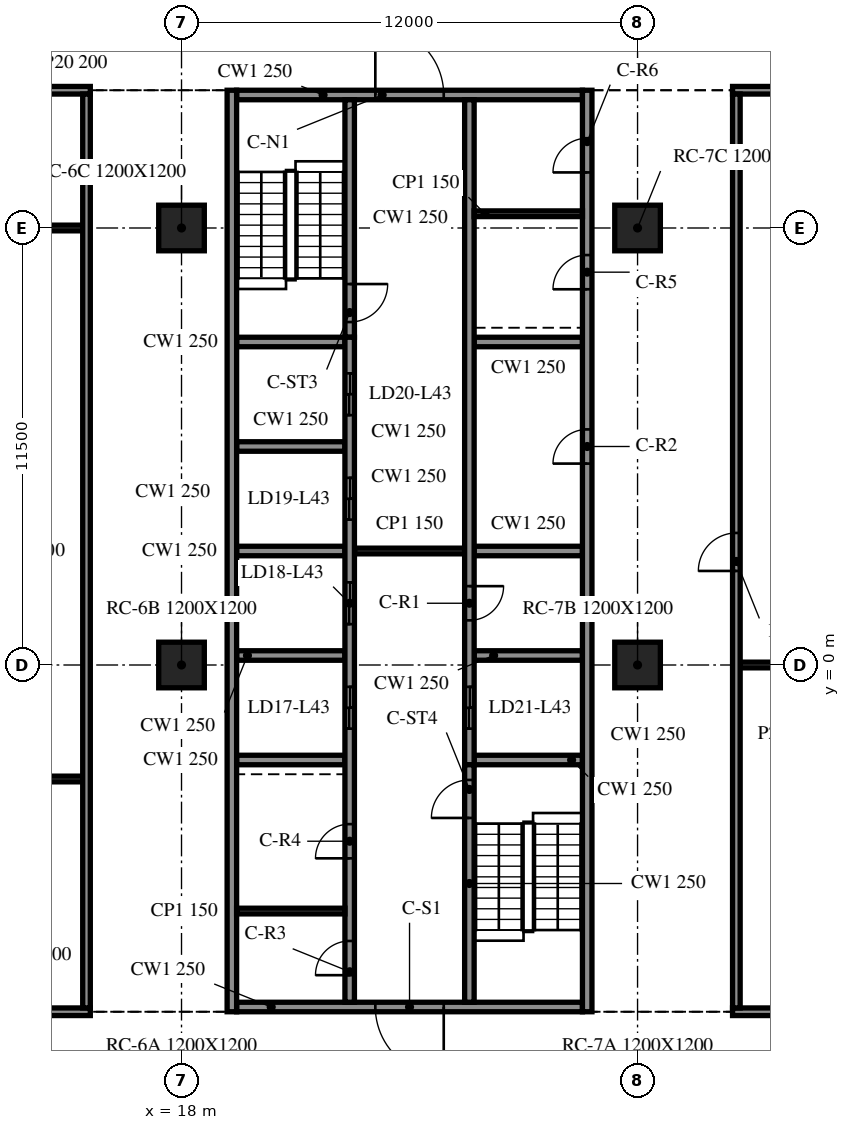
"""IFC4 building model, lengths in metres.
Left out: names, types, materials, properties, quantities, classifications, styles, units other than length and angle.
Written with IfcOpenShell. Run it as: python <this file> out.ifc"""

import sys

from ifc_helpers import new_model, si_unit, direction, frame, frame_2d, origin, origin_2d, place, context, subcontext, project, spatial, rectangle, extrude, element, fill, save


model = new_model("IFC4")
c1 = context("Model", 3, precision=1e-05, world=origin(), true_north=direction((0.0, 1.0)))
c2 = subcontext(c1, "Body", "Model", "MODEL_VIEW")
j1 = project(units=[si_unit("LENGTHUNIT", "METRE"), si_unit("PLANEANGLEUNIT", "RADIAN")], contexts=[c1])
p1 = place(None, origin())
s1 = spatial("IfcSite", under=j1, at=p1, CompositionType="ELEMENT")
p2 = place(p1, origin())
s2 = spatial("IfcBuilding", under=s1, at=p2, CompositionType="ELEMENT")
p3 = place(p2, frame((0.0, 0.0, 182.0)))
s3 = spatial("IfcBuildingStorey", under=s2, at=p3, CompositionType="ELEMENT", Elevation=182.0)
for number, where, z_axis, x_axis in (
    (1, (18.0, 0.0, -0.34), (0.0, 0.0, 1.0), (1.0, 0.0, 0.0)),
    (2, (18.0, 11.5, -0.34), (0.0, 0.0, 1.0), (1.0, 0.0, 0.0)),
    (3, (30.0, 0.0, -0.34), (0.0, 0.0, 1.0), (1.0, 0.0, 0.0)),
    (4, (30.0, 11.5, -0.34), (0.0, 0.0, 1.0), (1.0, 0.0, 0.0)),
):
    element("IfcColumn", number, at=place(p3, frame(where, z_axis=z_axis, x_axis=x_axis)), inside=s3, PredefinedType="COLUMN", context=c2, shape_type="SweptSolid", body=[
        extrude(rectangle(XDim=1.2, YDim=1.2, at=origin_2d()), origin(), (0.0, 0.0, 1.0), 3.8),
    ])
p4 = place(p3, frame((19.325, 15.125, 0.0), z_axis=(0.0, 0.0, 1.0), x_axis=(0.0, -1.0, 0.0)))
e5 = element("IfcWall", 5, at=p4, inside=s3, PredefinedType="SOLIDWALL", context=c2, shape_type="SweptSolid", body=[
    extrude(rectangle(XDim=24.25, YDim=0.25, at=frame_2d((12.125, 0.0))), origin(), (0.0, 0.0, 1.0), 3.46),
])
p5 = place(p3, frame((28.675, -9.125, 0.0), z_axis=(0.0, 0.0, 1.0), x_axis=(0.0, 1.0, 0.0)))
e6 = element("IfcWall", 6, at=p5, inside=s3, PredefinedType="SOLIDWALL", context=c2, shape_type="SweptSolid", body=[
    extrude(rectangle(XDim=24.25, YDim=0.25, at=frame_2d((12.125, 0.0))), origin(), (0.0, 0.0, 1.0), 3.46),
])
p6 = place(p5, frame((14.425, 0.0, 0.0)))
e7 = element("IfcOpeningElement", 7, at=p6, cuts=e6, PredefinedType="OPENING", context=c2, shape_type="SweptSolid", body=[
    extrude(rectangle(XDim=0.9, YDim=2.1, at=frame_2d((0.45, 1.05))), frame((0.0, 0.135, 0.0), z_axis=(0.0, -1.0, 0.0), x_axis=(1.0, 0.0, 0.0)), (0.0, 0.0, 1.0), 0.27),
])
p7 = place(p5, frame((19.012, 0.0, 0.0)))
e8 = element("IfcOpeningElement", 8, at=p7, cuts=e6, PredefinedType="OPENING", context=c2, shape_type="SweptSolid", body=[
    extrude(rectangle(XDim=0.9, YDim=2.1, at=frame_2d((0.45, 1.05))), frame((0.0, 0.135, 0.0), z_axis=(0.0, -1.0, 0.0), x_axis=(1.0, 0.0, 0.0)), (0.0, 0.0, 1.0), 0.27),
])
p8 = place(p5, frame((22.087, 0.0, 0.0)))
e9 = element("IfcOpeningElement", 9, at=p8, cuts=e6, PredefinedType="OPENING", context=c2, shape_type="SweptSolid", body=[
    extrude(rectangle(XDim=0.9, YDim=2.1, at=frame_2d((0.45, 1.05))), frame((0.0, 0.135, 0.0), z_axis=(0.0, -1.0, 0.0), x_axis=(1.0, 0.0, 0.0)), (0.0, 0.0, 1.0), 0.27),
])
p9 = place(p3, frame((28.55, -9.0, 0.0), z_axis=(0.0, 0.0, 1.0), x_axis=(-1.0, 0.0, 0.0)))
e10 = element("IfcWall", 10, at=p9, inside=s3, PredefinedType="SOLIDWALL", context=c2, shape_type="SweptSolid", body=[
    extrude(rectangle(XDim=9.1, YDim=0.25, at=frame_2d((4.55, 0.0))), origin(), (0.0, 0.0, 1.0), 3.46),
])
p10 = place(p9, frame((3.65, 0.0, 0.0)))
e11 = element("IfcOpeningElement", 11, at=p10, cuts=e10, PredefinedType="OPENING", context=c2, shape_type="SweptSolid", body=[
    extrude(rectangle(XDim=1.8, YDim=2.1, at=frame_2d((0.9, 1.05))), frame((0.0, 0.135, 0.0), z_axis=(0.0, -1.0, 0.0), x_axis=(1.0, 0.0, 0.0)), (0.0, 0.0, 1.0), 0.27),
])
p11 = place(p3, frame((19.45, 15.0, 0.0), z_axis=(0.0, 0.0, 1.0), x_axis=(1.0, 0.0, 0.0)))
e12 = element("IfcWall", 12, at=p11, inside=s3, PredefinedType="SOLIDWALL", context=c2, shape_type="SweptSolid", body=[
    extrude(rectangle(XDim=9.1, YDim=0.25, at=frame_2d((4.55, 0.0))), origin(), (0.0, 0.0, 1.0), 3.46),
])
p12 = place(p11, frame((3.65, 0.0, 0.0)))
e13 = element("IfcOpeningElement", 13, at=p12, cuts=e12, PredefinedType="OPENING", context=c2, shape_type="SweptSolid", body=[
    extrude(rectangle(XDim=1.8, YDim=2.1, at=frame_2d((0.9, 1.05))), frame((0.0, 0.135, 0.0), z_axis=(0.0, -1.0, 0.0), x_axis=(1.0, 0.0, 0.0)), (0.0, 0.0, 1.0), 0.27),
])
p13 = place(p3, frame((22.425, -8.875, 0.0), z_axis=(0.0, 0.0, 1.0), x_axis=(0.0, 1.0, 0.0)))
e14 = element("IfcWall", 14, at=p13, inside=s3, PredefinedType="SOLIDWALL", context=c2, shape_type="SweptSolid", body=[
    extrude(rectangle(XDim=17.5, YDim=0.25, at=frame_2d((8.75, 0.0))), origin(), (0.0, 0.0, 1.0), 3.46),
])
p14 = place(p13, frame((7.2, 0.0, 0.0)))
e15 = element("IfcOpeningElement", 15, at=p14, cuts=e14, PredefinedType="OPENING", context=c2, shape_type="SweptSolid", body=[
    extrude(rectangle(XDim=1.1, YDim=2.1, at=frame_2d((0.55, 1.05))), frame((0.0, 0.135, 0.0), z_axis=(0.0, -1.0, 0.0), x_axis=(1.0, 0.0, 0.0)), (0.0, 0.0, 1.0), 0.27),
])
p15 = place(p13, frame((9.95, 0.0, 0.0)))
e16 = element("IfcOpeningElement", 16, at=p15, cuts=e14, PredefinedType="OPENING", context=c2, shape_type="SweptSolid", body=[
    extrude(rectangle(XDim=1.1, YDim=2.1, at=frame_2d((0.55, 1.05))), frame((0.0, 0.135, 0.0), z_axis=(0.0, -1.0, 0.0), x_axis=(1.0, 0.0, 0.0)), (0.0, 0.0, 1.0), 0.27),
])
p16 = place(p13, frame((12.7, 0.0, 0.0)))
e17 = element("IfcOpeningElement", 17, at=p16, cuts=e14, PredefinedType="OPENING", context=c2, shape_type="SweptSolid", body=[
    extrude(rectangle(XDim=1.1, YDim=2.1, at=frame_2d((0.55, 1.05))), frame((0.0, 0.135, 0.0), z_axis=(0.0, -1.0, 0.0), x_axis=(1.0, 0.0, 0.0)), (0.0, 0.0, 1.0), 0.27),
])
p17 = place(p13, frame((15.45, 0.0, 0.0)))
e18 = element("IfcOpeningElement", 18, at=p17, cuts=e14, PredefinedType="OPENING", context=c2, shape_type="SweptSolid", body=[
    extrude(rectangle(XDim=1.1, YDim=2.1, at=frame_2d((0.55, 1.05))), frame((0.0, 0.135, 0.0), z_axis=(0.0, -1.0, 0.0), x_axis=(1.0, 0.0, 0.0)), (0.0, 0.0, 1.0), 0.27),
])
p18 = place(p13, frame((0.712, 0.0, 0.0)))
e19 = element("IfcOpeningElement", 19, at=p18, cuts=e14, PredefinedType="OPENING", context=c2, shape_type="SweptSolid", body=[
    extrude(rectangle(XDim=0.9, YDim=2.1, at=frame_2d((0.45, 1.05))), frame((0.0, 0.135, 0.0), z_axis=(0.0, -1.0, 0.0), x_axis=(1.0, 0.0, 0.0)), (0.0, 0.0, 1.0), 0.27),
])
p19 = place(p13, frame((3.788, 0.0, 0.0)))
e20 = element("IfcOpeningElement", 20, at=p19, cuts=e14, PredefinedType="OPENING", context=c2, shape_type="SweptSolid", body=[
    extrude(rectangle(XDim=0.9, YDim=2.1, at=frame_2d((0.45, 1.05))), frame((0.0, 0.135, 0.0), z_axis=(0.0, -1.0, 0.0), x_axis=(1.0, 0.0, 0.0)), (0.0, 0.0, 1.0), 0.27),
])
p20 = place(p3, frame((22.425, 14.875, 0.0), z_axis=(0.0, 0.0, 1.0), x_axis=(0.0, -1.0, 0.0)))
e21 = element("IfcWall", 21, at=p20, inside=s3, PredefinedType="SOLIDWALL", context=c2, shape_type="SweptSolid", body=[
    extrude(rectangle(XDim=6.25, YDim=0.25, at=frame_2d((3.125, 0.0))), origin(), (0.0, 0.0, 1.0), 3.46),
])
p21 = place(p20, frame((4.85, 0.0, 0.0)))
e22 = element("IfcOpeningElement", 22, at=p21, cuts=e21, PredefinedType="OPENING", context=c2, shape_type="SweptSolid", body=[
    extrude(rectangle(XDim=1.0, YDim=2.1, at=frame_2d((0.5, 1.05))), frame((0.0, 0.135, 0.0), z_axis=(0.0, -1.0, 0.0), x_axis=(1.0, 0.0, 0.0)), (0.0, 0.0, 1.0), 0.27),
])
p22 = place(p3, frame((25.575, -8.875, 0.0), z_axis=(0.0, 0.0, 1.0), x_axis=(0.0, 1.0, 0.0)))
e23 = element("IfcWall", 23, at=p22, inside=s3, PredefinedType="SOLIDWALL", context=c2, shape_type="SweptSolid", body=[
    extrude(rectangle(XDim=6.25, YDim=0.25, at=frame_2d((3.125, 0.0))), origin(), (0.0, 0.0, 1.0), 3.46),
])
p23 = place(p22, frame((4.85, 0.0, 0.0)))
e24 = element("IfcOpeningElement", 24, at=p23, cuts=e23, PredefinedType="OPENING", context=c2, shape_type="SweptSolid", body=[
    extrude(rectangle(XDim=1.0, YDim=2.1, at=frame_2d((0.5, 1.05))), frame((0.0, 0.135, 0.0), z_axis=(0.0, -1.0, 0.0), x_axis=(1.0, 0.0, 0.0)), (0.0, 0.0, 1.0), 0.27),
])
p24 = place(p3, frame((25.575, 14.875, 0.0), z_axis=(0.0, 0.0, 1.0), x_axis=(0.0, -1.0, 0.0)))
e25 = element("IfcWall", 25, at=p24, inside=s3, PredefinedType="SOLIDWALL", context=c2, shape_type="SweptSolid", body=[
    extrude(rectangle(XDim=17.5, YDim=0.25, at=frame_2d((8.75, 0.0))), origin(), (0.0, 0.0, 1.0), 3.46),
])
p25 = place(p24, frame((15.45, 0.0, 0.0)))
e26 = element("IfcOpeningElement", 26, at=p25, cuts=e25, PredefinedType="OPENING", context=c2, shape_type="SweptSolid", body=[
    extrude(rectangle(XDim=1.1, YDim=2.1, at=frame_2d((0.55, 1.05))), frame((0.0, 0.135, 0.0), z_axis=(0.0, -1.0, 0.0), x_axis=(1.0, 0.0, 0.0)), (0.0, 0.0, 1.0), 0.27),
])
p26 = place(p24, frame((12.8, 0.0, 0.0)))
e27 = element("IfcOpeningElement", 27, at=p26, cuts=e25, PredefinedType="OPENING", context=c2, shape_type="SweptSolid", body=[
    extrude(rectangle(XDim=0.9, YDim=2.1, at=frame_2d((0.45, 1.05))), frame((0.0, 0.135, 0.0), z_axis=(0.0, -1.0, 0.0), x_axis=(1.0, 0.0, 0.0)), (0.0, 0.0, 1.0), 0.27),
])
for number, where, z_axis, x_axis in (
    (28, (19.45, -2.5, 0.0), (0.0, 0.0, 1.0), (1.0, 0.0, 0.0)),
    (29, (19.45, 0.25, 0.0), (0.0, 0.0, 1.0), (1.0, 0.0, 0.0)),
    (30, (19.45, 3.0, 0.0), (0.0, 0.0, 1.0), (1.0, 0.0, 0.0)),
    (31, (19.45, 5.75, 0.0), (0.0, 0.0, 1.0), (1.0, 0.0, 0.0)),
    (32, (19.45, 8.5, 0.0), (0.0, 0.0, 1.0), (1.0, 0.0, 0.0)),
    (33, (25.7, -2.5, 0.0), (0.0, 0.0, 1.0), (1.0, 0.0, 0.0)),
    (34, (25.7, 0.25, 0.0), (0.0, 0.0, 1.0), (1.0, 0.0, 0.0)),
    (35, (25.7, 3.0, 0.0), (0.0, 0.0, 1.0), (1.0, 0.0, 0.0)),
    (36, (25.7, 8.5, 0.0), (0.0, 0.0, 1.0), (1.0, 0.0, 0.0)),
):
    element("IfcWall", number, at=place(p3, frame(where, z_axis=z_axis, x_axis=x_axis)), inside=s3, PredefinedType="SOLIDWALL", context=c2, shape_type="SweptSolid", body=[
        extrude(rectangle(XDim=2.85, YDim=0.25, at=frame_2d((1.425, 0.0))), origin(), (0.0, 0.0, 1.0), 3.46),
    ])
p27 = place(p3, frame((22.55, 3.0, 0.0), z_axis=(0.0, 0.0, 1.0), x_axis=(1.0, 0.0, 0.0)))
e37 = element("IfcWall", 37, at=p27, inside=s3, PredefinedType="PARTITIONING", context=c2, shape_type="SweptSolid", body=[
    extrude(rectangle(XDim=2.9, YDim=0.15, at=frame_2d((1.45, 0.0))), origin(), (0.0, 0.0, 1.0), 3.46),
])
for number, where, z_axis, x_axis in (
    (38, (19.45, -6.475, 0.0), (0.0, 0.0, 1.0), (1.0, 0.0, 0.0)),
    (39, (25.7, 11.875, 0.0), (0.0, 0.0, 1.0), (1.0, 0.0, 0.0)),
):
    element("IfcWall", number, at=place(p3, frame(where, z_axis=z_axis, x_axis=x_axis)), inside=s3, PredefinedType="PARTITIONING", context=c2, shape_type="SweptSolid", body=[
        extrude(rectangle(XDim=2.85, YDim=0.15, at=frame_2d((1.425, 0.0))), origin(), (0.0, 0.0, 1.0), 3.46),
    ])
p28 = place(p3, frame((8.3, -9.125, 0.0), z_axis=(0.0, 0.0, 1.0), x_axis=(1.0, 0.0, 0.0)))
e40 = element("IfcWall", 40, at=p28, inside=s3, PredefinedType="PARTITIONING", context=c2, shape_type="SweptSolid", body=[
    extrude(rectangle(XDim=7.3, YDim=0.2, at=frame_2d((3.65, 0.0))), origin(), (0.0, 0.0, 1.0), 3.46),
])
p29 = place(p28, frame((3.1, 0.0, 0.0)))
e41 = element("IfcOpeningElement", 41, at=p29, cuts=e40, PredefinedType="OPENING", context=c2, shape_type="SweptSolid", body=[
    extrude(rectangle(XDim=0.9, YDim=2.1, at=frame_2d((0.45, 1.05))), frame((0.0, 0.11, 0.0), z_axis=(0.0, -1.0, 0.0), x_axis=(1.0, 0.0, 0.0)), (0.0, 0.0, 1.0), 0.22),
])
p30 = place(p3, frame((32.5, -9.125, 0.0), z_axis=(0.0, 0.0, 1.0), x_axis=(1.0, 0.0, 0.0)))
e42 = element("IfcWall", 42, at=p30, inside=s3, PredefinedType="PARTITIONING", context=c2, shape_type="SweptSolid", body=[
    extrude(rectangle(XDim=13.05, YDim=0.2, at=frame_2d((6.525, 0.0))), origin(), (0.0, 0.0, 1.0), 3.46),
])
p31 = place(p30, frame((5.3, 0.0, 0.0)))
e43 = element("IfcOpeningElement", 43, at=p31, cuts=e42, PredefinedType="OPENING", context=c2, shape_type="SweptSolid", body=[
    extrude(rectangle(XDim=1.0, YDim=2.1, at=frame_2d((0.5, 1.05))), frame((0.0, 0.11, 0.0), z_axis=(0.0, -1.0, 0.0), x_axis=(1.0, 0.0, 0.0)), (0.0, 0.0, 1.0), 0.22),
])
p32 = place(p30, frame((6.9, 0.0, 0.0)))
e44 = element("IfcOpeningElement", 44, at=p32, cuts=e42, PredefinedType="OPENING", context=c2, shape_type="SweptSolid", body=[
    extrude(rectangle(XDim=1.0, YDim=2.1, at=frame_2d((0.5, 1.05))), frame((0.0, 0.11, 0.0), z_axis=(0.0, -1.0, 0.0), x_axis=(1.0, 0.0, 0.0)), (0.0, 0.0, 1.0), 0.22),
])
p33 = place(p3, frame((8.5, -3.0, 0.0), z_axis=(0.0, 0.0, 1.0), x_axis=(1.0, 0.0, 0.0)))
e45 = element("IfcWall", 45, at=p33, inside=s3, PredefinedType="PARTITIONING", context=c2, shape_type="SweptSolid", body=[
    extrude(rectangle(XDim=6.9, YDim=0.15, at=frame_2d((3.45, 0.0))), origin(), (0.0, 0.0, 1.0), 3.46),
])
p34 = place(p3, frame((32.7, 0.0, 0.0), z_axis=(0.0, 0.0, 1.0), x_axis=(1.0, 0.0, 0.0)))
e46 = element("IfcWall", 46, at=p34, inside=s3, PredefinedType="PARTITIONING", context=c2, shape_type="SweptSolid", body=[
    extrude(rectangle(XDim=8.7, YDim=0.15, at=frame_2d((4.35, 0.0))), origin(), (0.0, 0.0, 1.0), 3.46),
])
p35 = place(p3, frame((8.5, 11.5, 0.0), z_axis=(0.0, 0.0, 1.0), x_axis=(1.0, 0.0, 0.0)))
e47 = element("IfcWall", 47, at=p35, inside=s3, PredefinedType="PARTITIONING", context=c2, shape_type="SweptSolid", body=[
    extrude(rectangle(XDim=6.9, YDim=0.15, at=frame_2d((3.45, 0.0))), origin(), (0.0, 0.0, 1.0), 3.46),
])
p36 = place(p3, frame((8.3, 15.125, 0.0), z_axis=(0.0, 0.0, 1.0), x_axis=(1.0, 0.0, 0.0)))
e48 = element("IfcWall", 48, at=p36, inside=s3, PredefinedType="PARTITIONING", context=c2, shape_type="SweptSolid", body=[
    extrude(rectangle(XDim=7.3, YDim=0.2, at=frame_2d((3.65, 0.0))), origin(), (0.0, 0.0, 1.0), 3.46),
])
p37 = place(p36, frame((3.1, 0.0, 0.0)))
e49 = element("IfcOpeningElement", 49, at=p37, cuts=e48, PredefinedType="OPENING", context=c2, shape_type="SweptSolid", body=[
    extrude(rectangle(XDim=0.9, YDim=2.1, at=frame_2d((0.45, 1.05))), frame((0.0, 0.11, 0.0), z_axis=(0.0, -1.0, 0.0), x_axis=(1.0, 0.0, 0.0)), (0.0, 0.0, 1.0), 0.22),
])
p38 = place(p3, frame((32.5, 15.125, 0.0), z_axis=(0.0, 0.0, 1.0), x_axis=(1.0, 0.0, 0.0)))
e50 = element("IfcWall", 50, at=p38, inside=s3, PredefinedType="PARTITIONING", context=c2, shape_type="SweptSolid", body=[
    extrude(rectangle(XDim=13.05, YDim=0.2, at=frame_2d((6.525, 0.0))), origin(), (0.0, 0.0, 1.0), 3.46),
])
p39 = place(p3, frame((15.5, -9.025, 0.0), z_axis=(0.0, 0.0, 1.0), x_axis=(0.0, 1.0, 0.0)))
e51 = element("IfcWall", 51, at=p39, inside=s3, PredefinedType="PARTITIONING", context=c2, shape_type="SweptSolid", body=[
    extrude(rectangle(XDim=24.05, YDim=0.2, at=frame_2d((12.025, 0.0))), origin(), (0.0, 0.0, 1.0), 3.46),
])
p40 = place(p3, frame((32.6, -9.025, 0.0), z_axis=(0.0, 0.0, 1.0), x_axis=(0.0, 1.0, 0.0)))
e52 = element("IfcWall", 52, at=p40, inside=s3, PredefinedType="PARTITIONING", context=c2, shape_type="SweptSolid", body=[
    extrude(rectangle(XDim=24.05, YDim=0.2, at=frame_2d((12.025, 0.0))), origin(), (0.0, 0.0, 1.0), 3.46),
])
p41 = place(p40, frame((11.5, 0.0, 0.0)))
e53 = element("IfcOpeningElement", 53, at=p41, cuts=e52, PredefinedType="OPENING", context=c2, shape_type="SweptSolid", body=[
    extrude(rectangle(XDim=1.0, YDim=2.1, at=frame_2d((0.5, 1.05))), frame((0.0, 0.11, 0.0), z_axis=(0.0, -1.0, 0.0), x_axis=(1.0, 0.0, 0.0)), (0.0, 0.0, 1.0), 0.22),
])
p42 = place(p10, origin())
e54 = element("IfcDoor", 54, at=p42, inside=s3, OperationType="DOUBLE_DOOR_SINGLE_SWING", PredefinedType="DOOR", context=c2, shape_type="SweptSolid", body=[
    extrude(rectangle(XDim=1.8, YDim=2.1, at=frame_2d((0.9, 1.05))), frame((0.0, 0.025, 0.0), z_axis=(0.0, -1.0, 0.0), x_axis=(1.0, 0.0, 0.0)), (0.0, 0.0, 1.0), 0.05),
])
fill(e11, e54)
p43 = place(p12, origin())
e55 = element("IfcDoor", 55, at=p43, inside=s3, OperationType="DOUBLE_DOOR_SINGLE_SWING", PredefinedType="DOOR", context=c2, shape_type="SweptSolid", body=[
    extrude(rectangle(XDim=1.8, YDim=2.1, at=frame_2d((0.9, 1.05))), frame((0.0, 0.025, 0.0), z_axis=(0.0, -1.0, 0.0), x_axis=(1.0, 0.0, 0.0)), (0.0, 0.0, 1.0), 0.05),
])
fill(e13, e55)
p44 = place(p25, origin())
e56 = element("IfcDoor", 56, at=p44, inside=s3, OperationType="DOUBLE_DOOR_SLIDING", PredefinedType="DOOR", context=c2, shape_type="SweptSolid", body=[
    extrude(rectangle(XDim=1.1, YDim=2.1, at=frame_2d((0.55, 1.05))), frame((0.0, 0.025, 0.0), z_axis=(0.0, -1.0, 0.0), x_axis=(1.0, 0.0, 0.0)), (0.0, 0.0, 1.0), 0.05),
])
fill(e26, e56)
p45 = place(p14, origin())
e57 = element("IfcDoor", 57, at=p45, inside=s3, OperationType="DOUBLE_DOOR_SLIDING", PredefinedType="DOOR", context=c2, shape_type="SweptSolid", body=[
    extrude(rectangle(XDim=1.1, YDim=2.1, at=frame_2d((0.55, 1.05))), frame((0.0, 0.025, 0.0), z_axis=(0.0, -1.0, 0.0), x_axis=(1.0, 0.0, 0.0)), (0.0, 0.0, 1.0), 0.05),
])
fill(e15, e57)
p46 = place(p15, origin())
e58 = element("IfcDoor", 58, at=p46, inside=s3, OperationType="DOUBLE_DOOR_SLIDING", PredefinedType="DOOR", context=c2, shape_type="SweptSolid", body=[
    extrude(rectangle(XDim=1.1, YDim=2.1, at=frame_2d((0.55, 1.05))), frame((0.0, 0.025, 0.0), z_axis=(0.0, -1.0, 0.0), x_axis=(1.0, 0.0, 0.0)), (0.0, 0.0, 1.0), 0.05),
])
fill(e16, e58)
p47 = place(p16, origin())
e59 = element("IfcDoor", 59, at=p47, inside=s3, OperationType="DOUBLE_DOOR_SLIDING", PredefinedType="DOOR", context=c2, shape_type="SweptSolid", body=[
    extrude(rectangle(XDim=1.1, YDim=2.1, at=frame_2d((0.55, 1.05))), frame((0.0, 0.025, 0.0), z_axis=(0.0, -1.0, 0.0), x_axis=(1.0, 0.0, 0.0)), (0.0, 0.0, 1.0), 0.05),
])
fill(e17, e59)
p48 = place(p17, origin())
e60 = element("IfcDoor", 60, at=p48, inside=s3, OperationType="DOUBLE_DOOR_SLIDING", PredefinedType="DOOR", context=c2, shape_type="SweptSolid", body=[
    extrude(rectangle(XDim=1.1, YDim=2.1, at=frame_2d((0.55, 1.05))), frame((0.0, 0.025, 0.0), z_axis=(0.0, -1.0, 0.0), x_axis=(1.0, 0.0, 0.0)), (0.0, 0.0, 1.0), 0.05),
])
fill(e18, e60)
p49 = place(p26, origin())
e61 = element("IfcDoor", 61, at=p49, inside=s3, OperationType="SINGLE_SWING_LEFT", PredefinedType="DOOR", context=c2, shape_type="SweptSolid", body=[
    extrude(rectangle(XDim=0.9, YDim=2.1, at=frame_2d((0.45, 1.05))), frame((0.0, 0.025, 0.0), z_axis=(0.0, -1.0, 0.0), x_axis=(1.0, 0.0, 0.0)), (0.0, 0.0, 1.0), 0.05),
])
fill(e27, e61)
p50 = place(p6, origin())
e62 = element("IfcDoor", 62, at=p50, inside=s3, OperationType="SINGLE_SWING_RIGHT", PredefinedType="DOOR", context=c2, shape_type="SweptSolid", body=[
    extrude(rectangle(XDim=0.9, YDim=2.1, at=frame_2d((0.45, 1.05))), frame((0.0, 0.025, 0.0), z_axis=(0.0, -1.0, 0.0), x_axis=(1.0, 0.0, 0.0)), (0.0, 0.0, 1.0), 0.05),
])
fill(e7, e62)
p51 = place(p18, origin())
e63 = element("IfcDoor", 63, at=p51, inside=s3, OperationType="SINGLE_SWING_LEFT", PredefinedType="DOOR", context=c2, shape_type="SweptSolid", body=[
    extrude(rectangle(XDim=0.9, YDim=2.1, at=frame_2d((0.45, 1.05))), frame((0.0, 0.025, 0.0), z_axis=(0.0, -1.0, 0.0), x_axis=(1.0, 0.0, 0.0)), (0.0, 0.0, 1.0), 0.05),
])
fill(e19, e63)
p52 = place(p19, origin())
e64 = element("IfcDoor", 64, at=p52, inside=s3, OperationType="SINGLE_SWING_RIGHT", PredefinedType="DOOR", context=c2, shape_type="SweptSolid", body=[
    extrude(rectangle(XDim=0.9, YDim=2.1, at=frame_2d((0.45, 1.05))), frame((0.0, 0.025, 0.0), z_axis=(0.0, -1.0, 0.0), x_axis=(1.0, 0.0, 0.0)), (0.0, 0.0, 1.0), 0.05),
])
fill(e20, e64)
p53 = place(p7, origin())
e65 = element("IfcDoor", 65, at=p53, inside=s3, OperationType="SINGLE_SWING_LEFT", PredefinedType="DOOR", context=c2, shape_type="SweptSolid", body=[
    extrude(rectangle(XDim=0.9, YDim=2.1, at=frame_2d((0.45, 1.05))), frame((0.0, 0.025, 0.0), z_axis=(0.0, -1.0, 0.0), x_axis=(1.0, 0.0, 0.0)), (0.0, 0.0, 1.0), 0.05),
])
fill(e8, e65)
p54 = place(p8, origin())
e66 = element("IfcDoor", 66, at=p54, inside=s3, OperationType="SINGLE_SWING_RIGHT", PredefinedType="DOOR", context=c2, shape_type="SweptSolid", body=[
    extrude(rectangle(XDim=0.9, YDim=2.1, at=frame_2d((0.45, 1.05))), frame((0.0, 0.025, 0.0), z_axis=(0.0, -1.0, 0.0), x_axis=(1.0, 0.0, 0.0)), (0.0, 0.0, 1.0), 0.05),
])
fill(e9, e66)
p55 = place(p21, origin())
e67 = element("IfcDoor", 67, at=p55, inside=s3, OperationType="SINGLE_SWING_LEFT", PredefinedType="DOOR", context=c2, shape_type="SweptSolid", body=[
    extrude(rectangle(XDim=1.0, YDim=2.1, at=frame_2d((0.5, 1.05))), frame((0.0, 0.025, 0.0), z_axis=(0.0, -1.0, 0.0), x_axis=(1.0, 0.0, 0.0)), (0.0, 0.0, 1.0), 0.05),
])
fill(e22, e67)
p56 = place(p23, origin())
e68 = element("IfcDoor", 68, at=p56, inside=s3, OperationType="SINGLE_SWING_RIGHT", PredefinedType="DOOR", context=c2, shape_type="SweptSolid", body=[
    extrude(rectangle(XDim=1.0, YDim=2.1, at=frame_2d((0.5, 1.05))), frame((0.0, 0.025, 0.0), z_axis=(0.0, -1.0, 0.0), x_axis=(1.0, 0.0, 0.0)), (0.0, 0.0, 1.0), 0.05),
])
fill(e24, e68)
p57 = place(p41, origin())
e69 = element("IfcDoor", 69, at=p57, inside=s3, OperationType="SINGLE_SWING_RIGHT", PredefinedType="DOOR", context=c2, shape_type="SweptSolid", body=[
    extrude(rectangle(XDim=1.0, YDim=2.1, at=frame_2d((0.5, 1.05))), frame((0.0, 0.025, 0.0), z_axis=(0.0, -1.0, 0.0), x_axis=(1.0, 0.0, 0.0)), (0.0, 0.0, 1.0), 0.05),
])
fill(e53, e69)
save(model, sys.argv[1])
